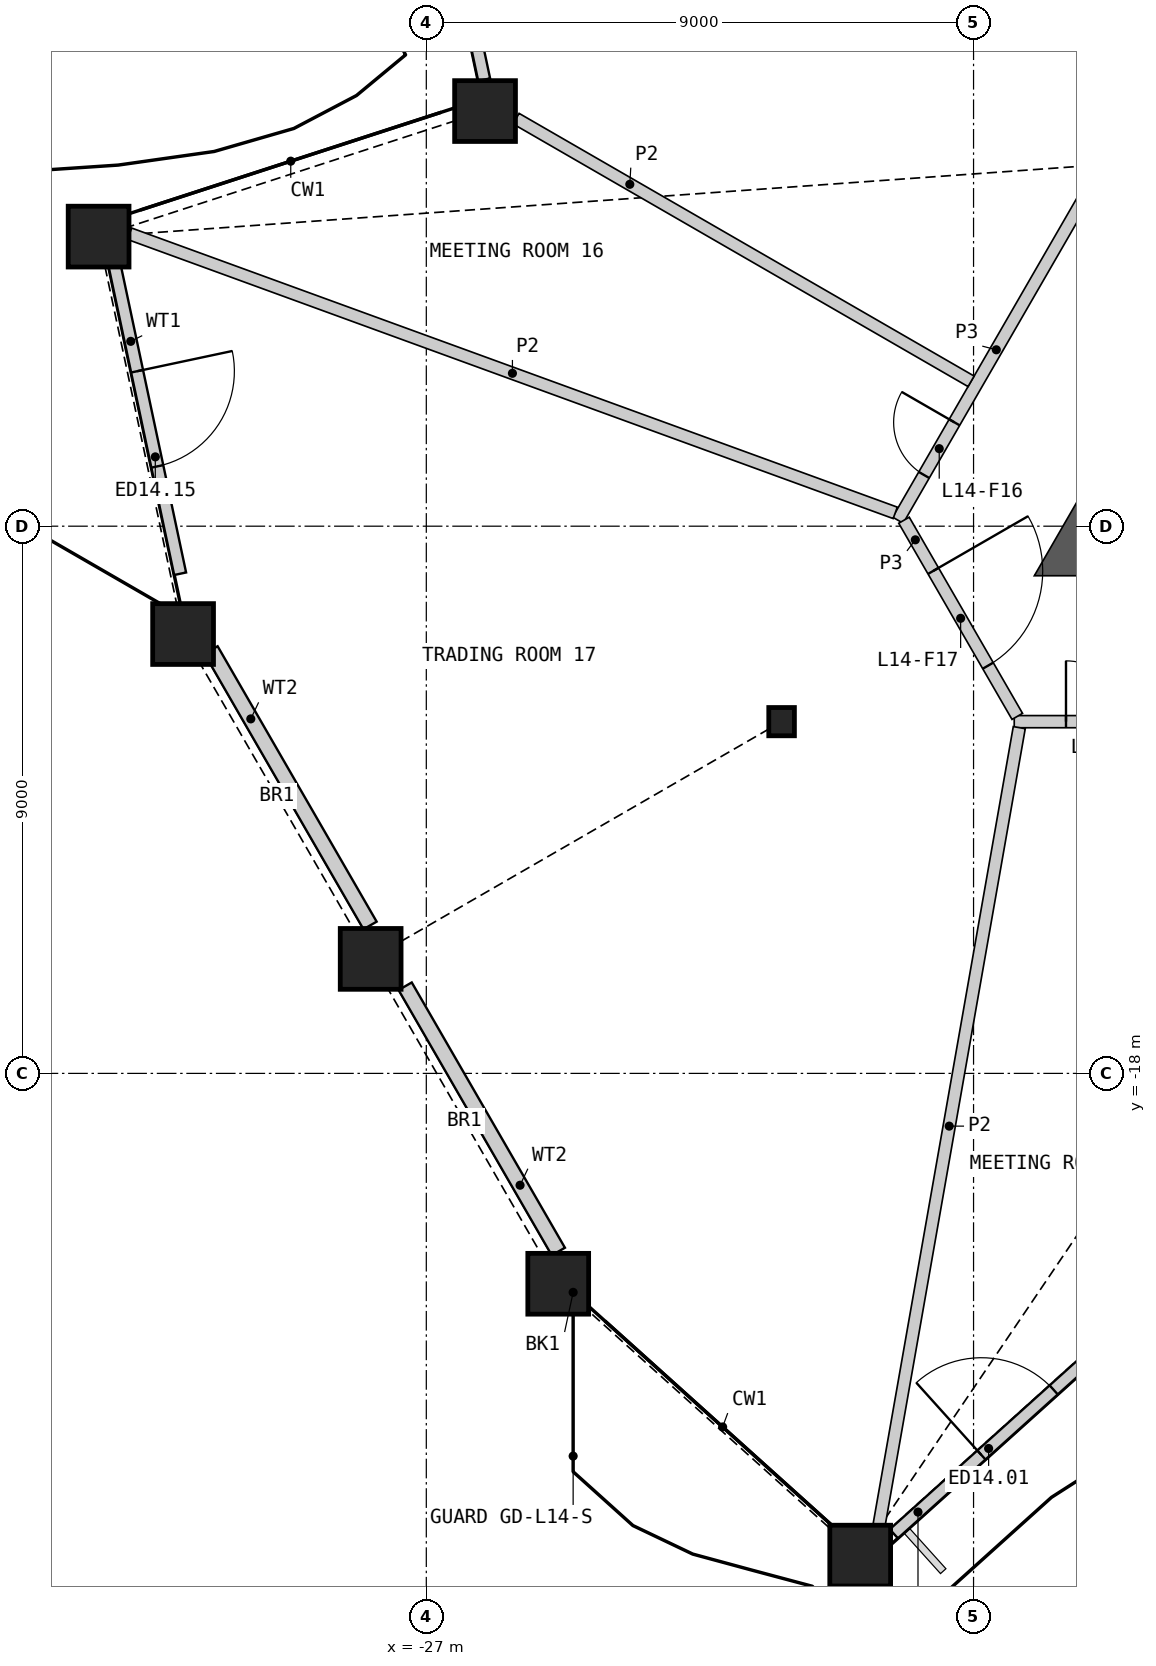
"""IFC4 building model, lengths in metres.
Left out: names, types, materials, properties, quantities, classifications, styles, units other than length and angle.
Written with IfcOpenShell. Run it as: python <this file> out.ifc"""

import sys

from ifc_helpers import new_model, si_unit, direction, frame, frame_2d, origin, origin_2d, place, context, subcontext, project, spatial, polyline, rectangle, hollow_rectangle, i_section, outline, extrude, element, fill, save


model = new_model("IFC4")
c1 = context("Model", 3, precision=1e-05, world=origin(), true_north=direction((0.0, 1.0)))
c2 = subcontext(c1, "Body", "Model", "MODEL_VIEW")
j1 = project(units=[si_unit("LENGTHUNIT", "METRE"), si_unit("PLANEANGLEUNIT", "RADIAN")], contexts=[c1])
p1 = place(None, origin())
s1 = spatial("IfcSite", under=j1, at=p1, CompositionType="ELEMENT")
p2 = place(p1, origin())
s2 = spatial("IfcBuilding", under=s1, at=p2, CompositionType="ELEMENT")
p3 = place(p2, frame((0.0, 0.0, 67.8)))
s3 = spatial("IfcBuildingStorey", under=s2, at=p3, CompositionType="ELEMENT", Elevation=67.8)
for number, where, z_axis, x_axis in (
    (1, (-24.83, -21.46, 0.0), (0.0, 0.0, 1.0), (1.0, 0.0, 0.0)),
    (2, (-19.864, -25.931, 0.0), (0.0, 0.0, 1.0), (1.0, 0.0, 0.0)),
    (3, (-26.034, -2.172, 0.0), (0.0, 0.0, 1.0), (1.0, 0.0, 0.0)),
    (4, (-32.389, -4.237, 0.0), (0.0, 0.0, 1.0), (1.0, 0.0, 0.0)),
    (5, (-31.0, -10.774, 0.0), (0.0, 0.0, 1.0), (1.0, 0.0, 0.0)),
    (6, (-27.915, -16.117, 0.0), (0.0, 0.0, 1.0), (1.0, 0.0, 0.0)),
):
    element("IfcColumn", number, at=place(p3, frame(where, z_axis=z_axis, x_axis=x_axis)), inside=s3, PredefinedType="COLUMN", context=c2, shape_type="SweptSolid", body=[
        extrude(hollow_rectangle(XDim=1.0, YDim=1.0, WallThickness=0.07, at=origin_2d()), origin(), (0.0, 0.0, 1.0), 4.2),
    ])
p4 = place(p3, frame((-21.157, -12.215, 0.0), z_axis=(0.0, 0.0, 1.0), x_axis=(1.0, 0.0, 0.0)))
e7 = element("IfcColumn", 7, at=p4, inside=s3, PredefinedType="COLUMN", context=c2, shape_type="SweptSolid", body=[
    extrude(i_section(OverallWidth=0.421, OverallDepth=0.465, WebThickness=0.045, FlangeThickness=0.072, at=origin_2d()), origin(), (0.0, 0.0, 1.0), 4.2),
])
p5 = place(p3, frame((-19.311, -25.573, 0.0), z_axis=(0.0, 0.0, 1.0), x_axis=(0.743150982682, 0.669123768027, 0.0)))
e8 = element("IfcWall", 8, at=p5, inside=s3, PredefinedType="SOLIDWALL", context=c2, shape_type="SweptSolid", body=[
    extrude(rectangle(XDim=5.343, YDim=0.2, at=frame_2d((2.671, 0.0))), origin(), (0.0, 0.0, 1.0), 3.189),
])
p6 = place(p5, frame((1.937, 0.0, 0.0)))
e9 = element("IfcOpeningElement", 9, at=p6, cuts=e8, PredefinedType="OPENING", context=c2, shape_type="SweptSolid", body=[
    extrude(rectangle(XDim=1.6, YDim=2.4, at=frame_2d((0.8, 1.2))), frame((0.0, 0.11, 0.0), z_axis=(0.0, -1.0, 0.0), x_axis=(1.0, 0.0, 0.0)), (0.0, 0.0, 1.0), 0.22),
])
p7 = place(p3, frame((-27.218, 3.848, 0.0), z_axis=(0.0, 0.0, 1.0), x_axis=(0.207943350029, -0.978140870825, 0.0)))
e10 = element("IfcWall", 10, at=p7, inside=s3, PredefinedType="SOLIDWALL", context=c2, shape_type="SweptSolid", body=[
    extrude(rectangle(XDim=5.626, YDim=0.2, at=frame_2d((2.813, 0.0))), origin(), (0.0, 0.0, 1.0), 3.189),
])
p8 = place(p7, frame((1.822, 0.0, 0.0)))
e11 = element("IfcOpeningElement", 11, at=p8, cuts=e10, PredefinedType="OPENING", context=c2, shape_type="SweptSolid", body=[
    extrude(rectangle(XDim=1.6, YDim=2.4, at=frame_2d((0.8, 1.2))), frame((0.0, 0.11, 0.0), z_axis=(0.0, -1.0, 0.0), x_axis=(1.0, 0.0, 0.0)), (0.0, 0.0, 1.0), 0.22),
])
p9 = place(p3, frame((-32.132, -4.686, 0.0), z_axis=(0.0, 0.0, 1.0), x_axis=(0.207896861912, -0.978150752598, 0.0)))
e12 = element("IfcWall", 12, at=p9, inside=s3, PredefinedType="SOLIDWALL", context=c2, shape_type="SweptSolid", body=[
    extrude(rectangle(XDim=5.21, YDim=0.2, at=frame_2d((2.605, 0.0))), origin(), (0.0, 0.0, 1.0), 3.189),
])
p10 = place(p9, frame((1.805, 0.0, 0.0)))
e13 = element("IfcOpeningElement", 13, at=p10, cuts=e12, PredefinedType="OPENING", context=c2, shape_type="SweptSolid", body=[
    extrude(rectangle(XDim=1.6, YDim=2.4, at=frame_2d((0.8, 1.2))), frame((0.0, 0.11, 0.0), z_axis=(0.0, -1.0, 0.0), x_axis=(1.0, 0.0, 0.0)), (0.0, 0.0, 1.0), 0.22),
])
p11 = place(p3, frame((-30.54, -11.037, 0.0), z_axis=(0.0, 0.0, 1.0), x_axis=(0.500009302692, -0.866020032806, 0.0)))
e14 = element("IfcWall", 14, at=p11, inside=s3, PredefinedType="SOLIDWALL", context=c2, shape_type="SweptSolid", body=[
    extrude(rectangle(XDim=5.231, YDim=0.25, at=frame_2d((2.615, 0.0))), origin(), (0.0, 0.0, 1.0), 3.189),
])
p12 = place(p3, frame((-27.348, -16.567, 0.0), z_axis=(0.0, 0.0, 1.0), x_axis=(0.500021659459, -0.866012898329, 0.0)))
e15 = element("IfcWall", 15, at=p12, inside=s3, PredefinedType="SOLIDWALL", context=c2, shape_type="SweptSolid", body=[
    extrude(rectangle(XDim=5.038, YDim=0.25, at=frame_2d((2.519, 0.0))), origin(), (0.0, 0.0, 1.0), 3.189),
])
p13 = place(p3, origin())
e16 = element("IfcWall", 16, at=p13, inside=s3, PredefinedType="SHEAR", context=c2, shape_type="SweptSolid", body=[
    extrude(outline(polyline([(-16.221, -8.465), (-15.441, -8.915), (-15.441, -9.815), (-17.0, -9.815), (-16.221, -8.465)])), origin(), (0.0, 0.0, 1.0), 3.8),
])
p14 = place(p3, frame((-17.331, -12.215, 0.0), z_axis=(0.0, 0.0, 1.0), x_axis=(1.0, 0.0, 0.0)))
e17 = element("IfcWall", 17, at=p14, inside=s3, PredefinedType="PARTITIONING", context=c2, shape_type="SweptSolid", body=[
    extrude(rectangle(XDim=6.51, YDim=0.2, at=frame_2d((3.255, 0.0))), origin(), (0.0, 0.0, 1.0), 3.8),
])
p15 = place(p14, frame((0.851, 0.0, 0.0)))
e18 = element("IfcOpeningElement", 18, at=p15, cuts=e17, PredefinedType="OPENING", context=c2, shape_type="SweptSolid", body=[
    extrude(rectangle(XDim=1.0, YDim=2.1, at=frame_2d((0.5, 1.05))), frame((0.0, 0.11, 0.0), z_axis=(0.0, -1.0, 0.0), x_axis=(1.0, 0.0, 0.0)), (0.0, 0.0, 1.0), 0.22),
])
p16 = place(p14, frame((4.058, 0.0, 0.0)))
e19 = element("IfcOpeningElement", 19, at=p16, cuts=e17, PredefinedType="OPENING", context=c2, shape_type="SweptSolid", body=[
    extrude(rectangle(XDim=1.0, YDim=2.1, at=frame_2d((0.5, 1.05))), frame((0.0, 0.11, 0.0), z_axis=(0.0, -1.0, 0.0), x_axis=(1.0, 0.0, 0.0)), (0.0, 0.0, 1.0), 0.22),
])
p17 = place(p3, frame((-19.244, -8.902, 0.0), z_axis=(0.0, 0.0, 1.0), x_axis=(0.499984737558, 0.86603421538, 0.0)))
e20 = element("IfcWall", 20, at=p17, inside=s3, PredefinedType="PARTITIONING", context=c2, shape_type="SweptSolid", body=[
    extrude(rectangle(XDim=6.473, YDim=0.2, at=frame_2d((3.236, 0.0))), origin(), (0.0, 0.0, 1.0), 3.8),
])
p18 = place(p17, frame((0.859, 0.0, 0.0)))
e21 = element("IfcOpeningElement", 21, at=p18, cuts=e20, PredefinedType="OPENING", context=c2, shape_type="SweptSolid", body=[
    extrude(rectangle(XDim=1.0, YDim=2.1, at=frame_2d((0.5, 1.05))), frame((0.0, 0.11, 0.0), z_axis=(0.0, -1.0, 0.0), x_axis=(1.0, 0.0, 0.0)), (0.0, 0.0, 1.0), 0.22),
])
p19 = place(p3, frame((-19.144, -8.902, 0.0), z_axis=(0.0, 0.0, 1.0), x_axis=(0.499958791762, -0.866049194065, 0.0)))
e22 = element("IfcWall", 22, at=p19, inside=s3, PredefinedType="PARTITIONING", context=c2, shape_type="SweptSolid", body=[
    extrude(rectangle(XDim=3.726, YDim=0.2, at=frame_2d((1.863, 0.0))), origin(), (0.0, 0.0, 1.0), 3.8),
])
p20 = place(p19, frame((0.963, 0.0, 0.0)))
e23 = element("IfcOpeningElement", 23, at=p20, cuts=e22, PredefinedType="OPENING", context=c2, shape_type="SweptSolid", body=[
    extrude(rectangle(XDim=1.8, YDim=2.1, at=frame_2d((0.9, 1.05))), frame((0.0, 0.11, 0.0), z_axis=(0.0, -1.0, 0.0), x_axis=(1.0, 0.0, 0.0)), (0.0, 0.0, 1.0), 0.22),
])
p21 = place(p3, frame((-31.879, -4.19, 0.0), z_axis=(0.0, 0.0, 1.0), x_axis=(0.939515478087, -0.34250644729, 0.0)))
e24 = element("IfcWall", 24, at=p21, inside=s3, PredefinedType="PARTITIONING", context=c2, shape_type="SweptSolid", body=[
    extrude(rectangle(XDim=13.402, YDim=0.2, at=frame_2d((6.701, 0.0))), origin(), (0.0, 0.0, 1.0), 2.885),
])
p22 = place(p3, frame((-19.552, -25.421, 0.0), z_axis=(0.0, 0.0, 1.0), x_axis=(0.173132292437, 0.984898578187, 0.0)))
e25 = element("IfcWall", 25, at=p22, inside=s3, PredefinedType="PARTITIONING", context=c2, shape_type="SweptSolid", body=[
    extrude(rectangle(XDim=13.309, YDim=0.2, at=frame_2d((6.654, 0.0))), origin(), (0.0, 0.0, 1.0), 2.885),
])
p23 = place(p3, frame((-25.524, -2.297, 0.0), z_axis=(0.0, 0.0, 1.0), x_axis=(0.866036909293, -0.499980071345, 0.0)))
e26 = element("IfcWall", 26, at=p23, inside=s3, PredefinedType="PARTITIONING", context=c2, shape_type="SweptSolid", body=[
    extrude(rectangle(XDim=8.641, YDim=0.2, at=frame_2d((4.32, 0.0))), origin(), (0.0, 0.0, 1.0), 2.885),
])
p24 = place(p6, origin())
e27 = element("IfcDoor", 27, at=p24, inside=s3, OperationType="DOUBLE_DOOR_SINGLE_SWING", PredefinedType="DOOR", context=c2, shape_type="SweptSolid", body=[
    extrude(rectangle(XDim=1.6, YDim=2.4, at=frame_2d((0.8, 1.2))), frame((0.0, 0.025, 0.0), z_axis=(0.0, -1.0, 0.0), x_axis=(1.0, 0.0, 0.0)), (0.0, 0.0, 1.0), 0.05),
])
fill(e9, e27)
p25 = place(p10, origin())
e28 = element("IfcDoor", 28, at=p25, inside=s3, OperationType="DOUBLE_DOOR_SINGLE_SWING", PredefinedType="DOOR", context=c2, shape_type="SweptSolid", body=[
    extrude(rectangle(XDim=1.6, YDim=2.4, at=frame_2d((0.8, 1.2))), frame((0.0, 0.025, 0.0), z_axis=(0.0, -1.0, 0.0), x_axis=(1.0, 0.0, 0.0)), (0.0, 0.0, 1.0), 0.05),
])
fill(e13, e28)
p26 = place(p15, origin())
e29 = element("IfcDoor", 29, at=p26, inside=s3, OperationType="SINGLE_SWING_LEFT", PredefinedType="DOOR", context=c2, shape_type="SweptSolid", body=[
    extrude(rectangle(XDim=1.0, YDim=2.1, at=frame_2d((0.5, 1.05))), frame((0.0, 0.025, 0.0), z_axis=(0.0, -1.0, 0.0), x_axis=(1.0, 0.0, 0.0)), (0.0, 0.0, 1.0), 0.05),
])
fill(e18, e29)
p27 = place(p18, origin())
e30 = element("IfcDoor", 30, at=p27, inside=s3, OperationType="SINGLE_SWING_RIGHT", PredefinedType="DOOR", context=c2, shape_type="SweptSolid", body=[
    extrude(rectangle(XDim=1.0, YDim=2.1, at=frame_2d((0.5, 1.05))), frame((0.0, 0.025, 0.0), z_axis=(0.0, -1.0, 0.0), x_axis=(1.0, 0.0, 0.0)), (0.0, 0.0, 1.0), 0.05),
])
fill(e21, e30)
p28 = place(p20, origin())
e31 = element("IfcDoor", 31, at=p28, inside=s3, OperationType="DOUBLE_DOOR_SINGLE_SWING", PredefinedType="DOOR", context=c2, shape_type="SweptSolid", body=[
    extrude(rectangle(XDim=1.8, YDim=2.1, at=frame_2d((0.9, 1.05))), frame((0.0, 0.025, 0.0), z_axis=(0.0, -1.0, 0.0), x_axis=(1.0, 0.0, 0.0)), (0.0, 0.0, 1.0), 0.05),
])
fill(e23, e31)
save(model, sys.argv[1])
